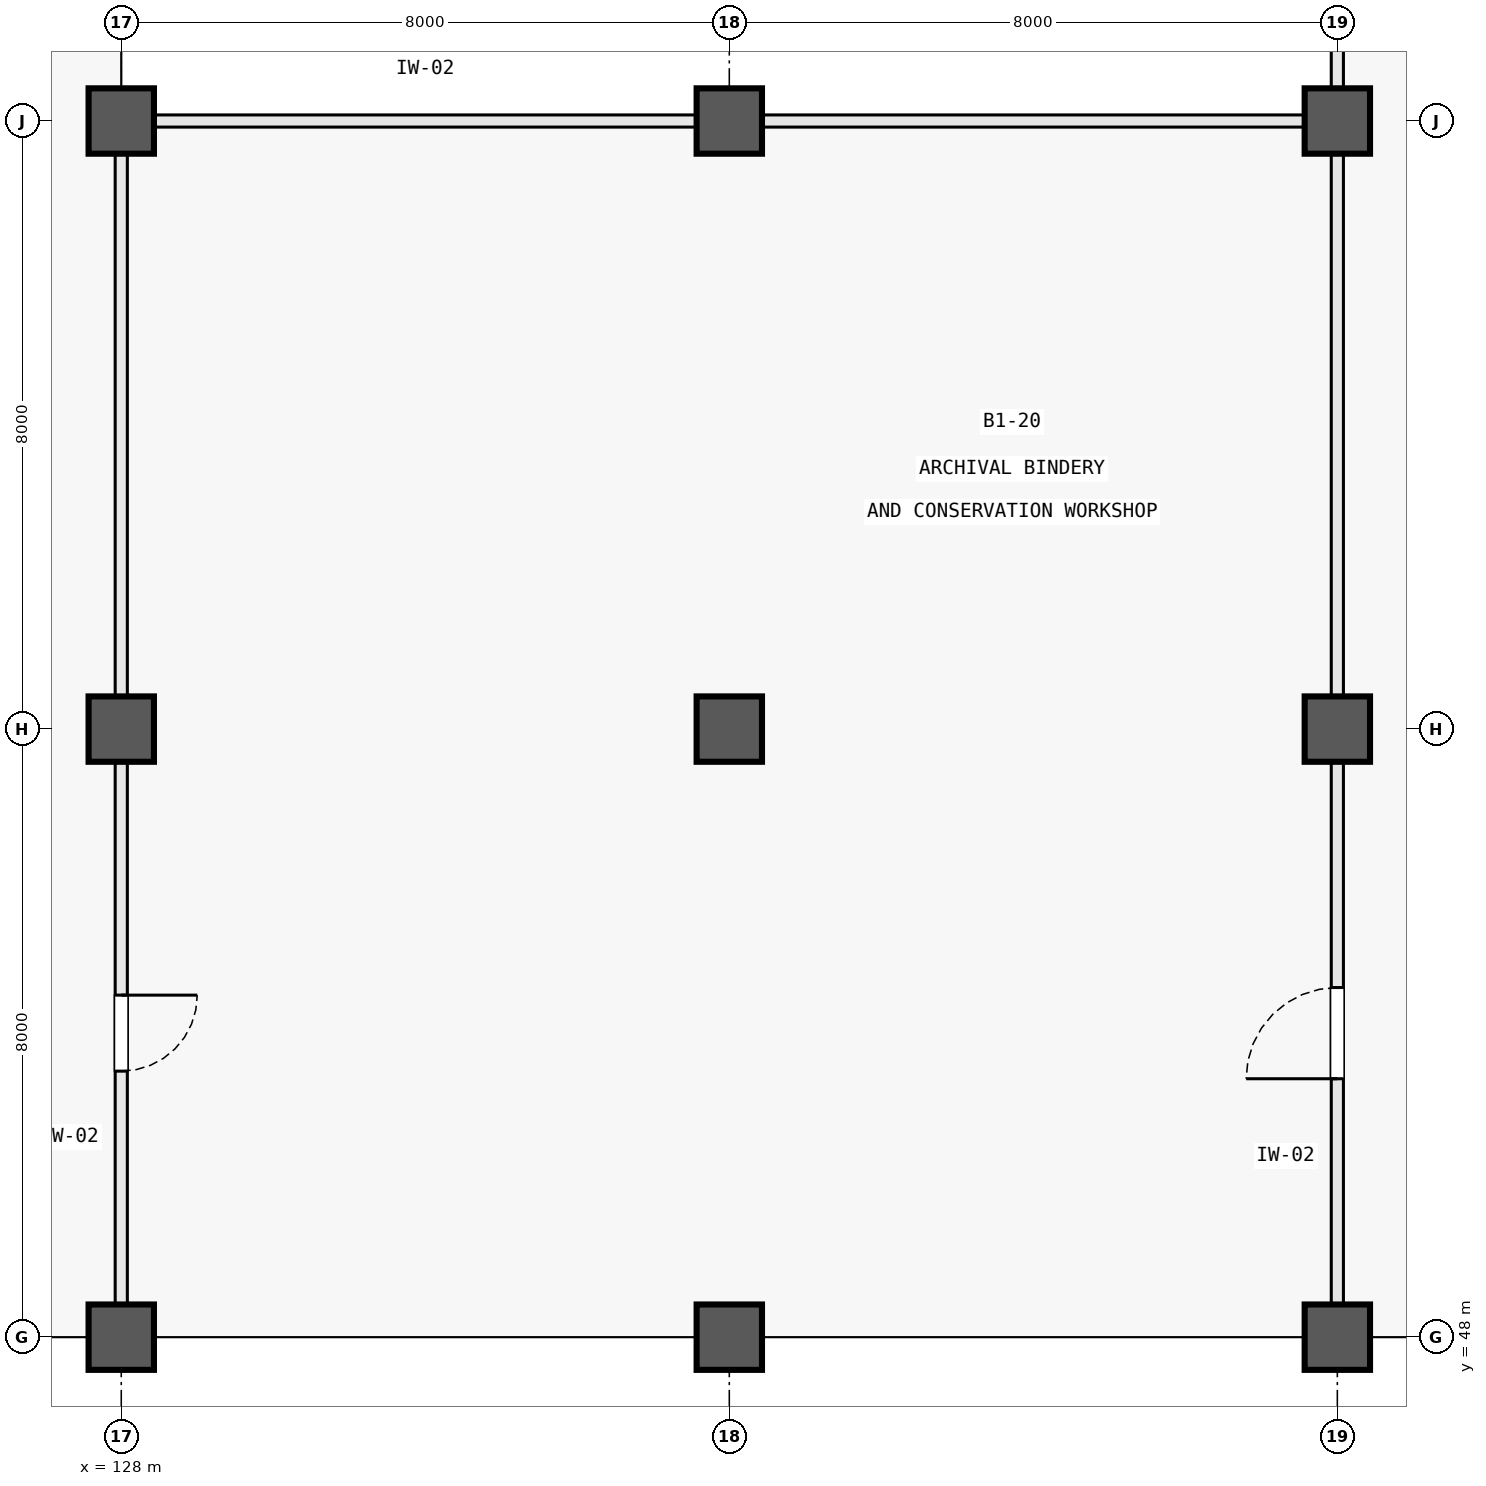
"""IFC4 building model, lengths in metres.
Left out: names, types, materials, properties, quantities, classifications, styles, units other than length and angle.
Written with IfcOpenShell. Run it as: python <this file> out.ifc"""

import sys

from ifc_helpers import new_model, si_unit, direction, frame, frame_2d, origin, origin_2d, place, context, subcontext, project, spatial, rectangle, extrude, element, fill, save


model = new_model("IFC4")
c1 = context("Model", 3, precision=1e-05, world=origin(), true_north=direction((0.0, 1.0)))
c2 = subcontext(c1, "Body", "Model", "MODEL_VIEW")
j1 = project(units=[si_unit("LENGTHUNIT", "METRE"), si_unit("PLANEANGLEUNIT", "RADIAN")], contexts=[c1])
p1 = place(None, origin())
s1 = spatial("IfcSite", under=j1, at=p1, CompositionType="ELEMENT")
p2 = place(p1, origin())
s2 = spatial("IfcBuilding", under=s1, at=p2, CompositionType="ELEMENT")
p3 = place(p2, frame((0.0, 0.0, -5.4)))
s3 = spatial("IfcBuildingStorey", under=s2, at=p3, CompositionType="ELEMENT", Elevation=-5.4)
for number, where, z_axis, x_axis in (
    (1, (128.0, 48.0, 0.0), (0.0, 0.0, 1.0), (1.0, 0.0, 0.0)),
    (2, (128.0, 56.0, 0.0), (0.0, 0.0, 1.0), (1.0, 0.0, 0.0)),
    (3, (128.0, 64.0, 0.0), (0.0, 0.0, 1.0), (1.0, 0.0, 0.0)),
    (4, (136.0, 48.0, 0.0), (0.0, 0.0, 1.0), (1.0, 0.0, 0.0)),
    (5, (136.0, 56.0, 0.0), (0.0, 0.0, 1.0), (1.0, 0.0, 0.0)),
    (6, (136.0, 64.0, 0.0), (0.0, 0.0, 1.0), (1.0, 0.0, 0.0)),
    (7, (144.0, 48.0, 0.0), (0.0, 0.0, 1.0), (1.0, 0.0, 0.0)),
    (8, (144.0, 56.0, 0.0), (0.0, 0.0, 1.0), (1.0, 0.0, 0.0)),
    (9, (144.0, 64.0, 0.0), (0.0, 0.0, 1.0), (1.0, 0.0, 0.0)),
):
    element("IfcColumn", number, at=place(p3, frame(where, z_axis=z_axis, x_axis=x_axis)), inside=s3, PredefinedType="COLUMN", context=c2, shape_type="SweptSolid", body=[
        extrude(rectangle(XDim=0.86, YDim=0.86, at=origin_2d()), origin(), (0.0, 0.0, 1.0), 5.4),
    ])
p4 = place(p3, frame((144.0, 48.44, 0.0), z_axis=(0.0, 0.0, 1.0), x_axis=(0.0, 1.0, 0.0)))
e10 = element("IfcWall", 10, at=p4, inside=s3, PredefinedType="PARTITIONING", context=c2, shape_type="SweptSolid", body=[
    extrude(rectangle(XDim=7.12, YDim=0.16, at=frame_2d((3.56, 0.0))), origin(), (0.0, 0.0, 1.0), 3.83),
])
p5 = place(p4, frame((2.96, 0.0, 0.0)))
e11 = element("IfcOpeningElement", 11, at=p5, cuts=e10, PredefinedType="OPENING", context=c2, shape_type="SweptSolid", body=[
    extrude(rectangle(XDim=1.2, YDim=2.25, at=frame_2d((0.6, 1.125))), frame((0.0, 0.092, 0.0), z_axis=(0.0, -1.0, 0.0), x_axis=(1.0, 0.0, 0.0)), (0.0, 0.0, 1.0), 0.184),
])
p6 = place(p3, frame((144.0, 56.44, 0.0), z_axis=(0.0, 0.0, 1.0), x_axis=(0.0, 1.0, 0.0)))
e12 = element("IfcWall", 12, at=p6, inside=s3, PredefinedType="PARTITIONING", context=c2, shape_type="SweptSolid", body=[
    extrude(rectangle(XDim=7.12, YDim=0.16, at=frame_2d((3.56, 0.0))), origin(), (0.0, 0.0, 1.0), 3.83),
])
p7 = place(p3, frame((144.0, 64.44, 0.0), z_axis=(0.0, 0.0, 1.0), x_axis=(0.0, 1.0, 0.0)))
e13 = element("IfcWall", 13, at=p7, inside=s3, PredefinedType="PARTITIONING", context=c2, shape_type="SweptSolid", body=[
    extrude(rectangle(XDim=9.12, YDim=0.16, at=frame_2d((4.56, 0.0))), origin(), (0.0, 0.0, 1.0), 3.83),
])
for number, where, z_axis, x_axis in (
    (14, (128.44, 64.0, 0.0), (0.0, 0.0, 1.0), (1.0, 0.0, 0.0)),
    (15, (136.44, 64.0, 0.0), (0.0, 0.0, 1.0), (1.0, 0.0, 0.0)),
):
    element("IfcWall", number, at=place(p3, frame(where, z_axis=z_axis, x_axis=x_axis)), inside=s3, PredefinedType="PARTITIONING", context=c2, shape_type="SweptSolid", body=[
        extrude(rectangle(XDim=7.12, YDim=0.16, at=frame_2d((3.56, 0.0))), origin(), (0.0, 0.0, 1.0), 3.83),
    ])
p8 = place(p3, frame((128.0, 48.44, 0.0), z_axis=(0.0, 0.0, 1.0), x_axis=(0.0, 1.0, 0.0)))
e16 = element("IfcWall", 16, at=p8, inside=s3, PredefinedType="PARTITIONING", context=c2, shape_type="SweptSolid", body=[
    extrude(rectangle(XDim=7.12, YDim=0.16, at=frame_2d((3.56, 0.0))), origin(), (0.0, 0.0, 1.0), 3.83),
])
p9 = place(p8, frame((3.06, 0.0, 0.0)))
e17 = element("IfcOpeningElement", 17, at=p9, cuts=e16, PredefinedType="OPENING", context=c2, shape_type="SweptSolid", body=[
    extrude(rectangle(XDim=1.0, YDim=2.15, at=frame_2d((0.5, 1.075))), frame((0.0, 0.092, 0.0), z_axis=(0.0, -1.0, 0.0), x_axis=(1.0, 0.0, 0.0)), (0.0, 0.0, 1.0), 0.184),
])
p10 = place(p3, frame((128.0, 56.44, 0.0), z_axis=(0.0, 0.0, 1.0), x_axis=(0.0, 1.0, 0.0)))
e18 = element("IfcWall", 18, at=p10, inside=s3, PredefinedType="PARTITIONING", context=c2, shape_type="SweptSolid", body=[
    extrude(rectangle(XDim=7.12, YDim=0.16, at=frame_2d((3.56, 0.0))), origin(), (0.0, 0.0, 1.0), 3.83),
])
p11 = place(p5, origin())
e19 = element("IfcDoor", 19, at=p11, inside=s3, OperationType="SINGLE_SWING_LEFT", PredefinedType="DOOR", context=c2, shape_type="SweptSolid", body=[
    extrude(rectangle(XDim=1.2, YDim=2.25, at=frame_2d((0.6, 1.125))), frame((0.0, 0.025, 0.0), z_axis=(0.0, -1.0, 0.0), x_axis=(1.0, 0.0, 0.0)), (0.0, 0.0, 1.0), 0.05),
])
fill(e11, e19)
p12 = place(p9, frame((1.0, 0.0, 0.0), z_axis=(0.0, 0.0, 1.0), x_axis=(-1.0, 0.0, 0.0)))
e20 = element("IfcDoor", 20, at=p12, inside=s3, OperationType="SINGLE_SWING_RIGHT", PredefinedType="DOOR", context=c2, shape_type="SweptSolid", body=[
    extrude(rectangle(XDim=1.0, YDim=2.15, at=frame_2d((0.5, 1.075))), frame((0.0, 0.025, 0.0), z_axis=(0.0, -1.0, 0.0), x_axis=(1.0, 0.0, 0.0)), (0.0, 0.0, 1.0), 0.05),
])
fill(e17, e20)
save(model, sys.argv[1])
